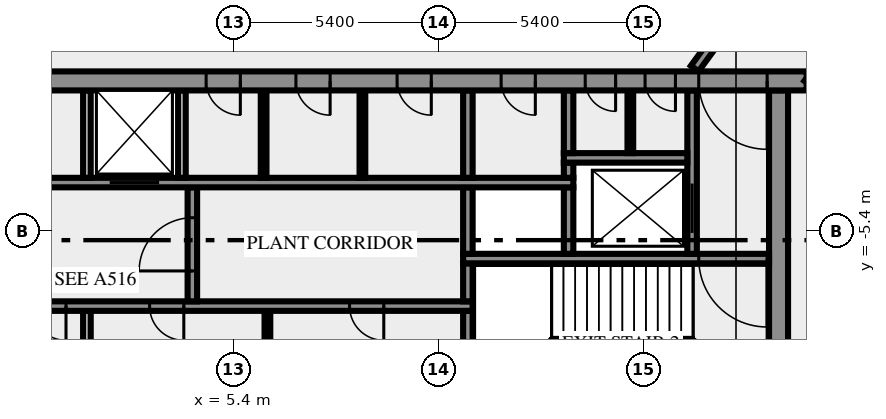
"""IFC4 building model, lengths in metres.
Left out: names, types, materials, properties, quantities, classifications, styles, units other than length and angle.
Written with IfcOpenShell. Run it as: python <this file> out.ifc"""

import sys

from ifc_helpers import new_model, si_unit, direction, frame, frame_2d, origin, place, context, subcontext, project, spatial, rectangle, extrude, element, fill, save


model = new_model("IFC4")
c1 = context("Model", 3, precision=1e-05, world=origin(), true_north=direction((0.0, 1.0)))
c2 = subcontext(c1, "Body", "Model", "MODEL_VIEW")
j1 = project(units=[si_unit("LENGTHUNIT", "METRE"), si_unit("PLANEANGLEUNIT", "RADIAN")], contexts=[c1])
p1 = place(None, origin())
s1 = spatial("IfcSite", under=j1, at=p1, CompositionType="ELEMENT")
p2 = place(p1, origin())
s2 = spatial("IfcBuilding", under=s1, at=p2, CompositionType="ELEMENT")
p3 = place(p2, frame((0.0, 0.0, 301.0)))
s3 = spatial("IfcBuildingStorey", under=s2, at=p3, CompositionType="ELEMENT", Elevation=301.0)
p4 = place(p3, frame((1.55, -10.5, 0.0), z_axis=(0.0, 0.0, 1.0), x_axis=(0.0, 1.0, 0.0)))
e1 = element("IfcWall", 1, at=p4, inside=s3, PredefinedType="SOLIDWALL", context=c2, shape_type="SweptSolid", body=[
    extrude(rectangle(XDim=3.0, YDim=0.2, at=frame_2d((1.5, 0.0))), origin(), (0.0, 0.0, 1.0), 5.65),
])
p5 = place(p3, frame((6.3, -10.5, 0.0), z_axis=(0.0, 0.0, 1.0), x_axis=(0.0, 1.0, 0.0)))
e2 = element("IfcWall", 2, at=p5, inside=s3, PredefinedType="PARTITIONING", context=c2, shape_type="SweptSolid", body=[
    extrude(rectangle(XDim=3.0, YDim=0.15, at=frame_2d((1.5, 0.0))), origin(), (0.0, 0.0, 1.0), 5.65),
])
p6 = place(p3, frame((11.575, -10.5, 0.0), z_axis=(0.0, 0.0, 1.0), x_axis=(0.0, 1.0, 0.0)))
e3 = element("IfcWall", 3, at=p6, inside=s3, PredefinedType="SHEAR", context=c2, shape_type="SweptSolid", body=[
    extrude(rectangle(XDim=3.0, YDim=0.25, at=frame_2d((1.5, 0.0))), origin(), (0.0, 0.0, 1.0), 5.65),
])
p7 = place(p3, frame((19.75, -10.5, 0.0), z_axis=(0.0, 0.0, 1.0), x_axis=(0.0, 1.0, 0.0)))
e4 = element("IfcWall", 4, at=p7, inside=s3, PredefinedType="SHEAR", context=c2, shape_type="SweptSolid", body=[
    extrude(rectangle(XDim=8.8, YDim=0.5, at=frame_2d((4.4, 0.0))), origin(), (0.0, 0.0, 1.0), 5.65),
])
p8 = place(p3, frame((11.7, -7.375, 0.0), z_axis=(0.0, 0.0, 1.0), x_axis=(-1.0, 0.0, 0.0)))
e5 = element("IfcWall", 5, at=p8, inside=s3, PredefinedType="SHEAR", context=c2, shape_type="SweptSolid", body=[
    extrude(rectangle(XDim=23.4, YDim=0.25, at=frame_2d((11.7, 0.0))), origin(), (0.0, 0.0, 1.0), 5.65),
])
p9 = place(p8, frame((13.475, 0.0, 0.0)))
e6 = element("IfcOpeningElement", 6, at=p9, cuts=e5, PredefinedType="OPENING", context=c2, shape_type="SweptSolid", body=[
    extrude(rectangle(XDim=0.9, YDim=2.1, at=frame_2d((0.45, 1.05))), frame((0.0, 0.135, 0.0), z_axis=(0.0, -1.0, 0.0), x_axis=(1.0, 0.0, 0.0)), (0.0, 0.0, 1.0), 0.27),
])
p10 = place(p8, frame((10.7, 0.0, 0.0)))
e7 = element("IfcOpeningElement", 7, at=p10, cuts=e5, PredefinedType="OPENING", context=c2, shape_type="SweptSolid", body=[
    extrude(rectangle(XDim=0.9, YDim=2.1, at=frame_2d((0.45, 1.05))), frame((0.0, 0.135, 0.0), z_axis=(0.0, -1.0, 0.0), x_axis=(1.0, 0.0, 0.0)), (0.0, 0.0, 1.0), 0.27),
])
p11 = place(p8, frame((7.6, 0.0, 0.0)))
e8 = element("IfcOpeningElement", 8, at=p11, cuts=e5, PredefinedType="OPENING", context=c2, shape_type="SweptSolid", body=[
    extrude(rectangle(XDim=0.9, YDim=2.1, at=frame_2d((0.45, 1.05))), frame((0.0, 0.135, 0.0), z_axis=(0.0, -1.0, 0.0), x_axis=(1.0, 0.0, 0.0)), (0.0, 0.0, 1.0), 0.27),
])
p12 = place(p8, frame((2.338, 0.0, 0.0)))
e9 = element("IfcOpeningElement", 9, at=p12, cuts=e5, PredefinedType="OPENING", context=c2, shape_type="SweptSolid", body=[
    extrude(rectangle(XDim=0.9, YDim=2.1, at=frame_2d((0.45, 1.05))), frame((0.0, 0.135, 0.0), z_axis=(0.0, -1.0, 0.0), x_axis=(1.0, 0.0, 0.0)), (0.0, 0.0, 1.0), 0.27),
])
p13 = place(p3, frame((4.325, -7.25, 0.0), z_axis=(0.0, 0.0, 1.0), x_axis=(0.0, 1.0, 0.0)))
e10 = element("IfcWall", 10, at=p13, inside=s3, PredefinedType="SHEAR", context=c2, shape_type="SweptSolid", body=[
    extrude(rectangle(XDim=3.0, YDim=0.25, at=frame_2d((1.5, 0.0))), origin(), (0.0, 0.0, 1.0), 5.65),
])
p14 = place(p13, frame((0.8, 0.0, 0.0)))
e11 = element("IfcOpeningElement", 11, at=p14, cuts=e10, PredefinedType="OPENING", context=c2, shape_type="SweptSolid", body=[
    extrude(rectangle(XDim=1.4, YDim=2.1, at=frame_2d((0.7, 1.05))), frame((0.0, 0.135, 0.0), z_axis=(0.0, -1.0, 0.0), x_axis=(1.0, 0.0, 0.0)), (0.0, 0.0, 1.0), 0.27),
])
p15 = place(p3, frame((11.575, -7.25, 0.0), z_axis=(0.0, 0.0, 1.0), x_axis=(0.0, 1.0, 0.0)))
e12 = element("IfcWall", 12, at=p15, inside=s3, PredefinedType="SHEAR", context=c2, shape_type="SweptSolid", body=[
    extrude(rectangle(XDim=1.0, YDim=0.25, at=frame_2d((0.5, 0.0))), origin(), (0.0, 0.0, 1.0), 5.65),
])
p16 = place(p3, frame((19.5, -6.125, 0.0), z_axis=(0.0, 0.0, 1.0), x_axis=(-1.0, 0.0, 0.0)))
e13 = element("IfcWall", 13, at=p16, inside=s3, PredefinedType="SHEAR", context=c2, shape_type="SweptSolid", body=[
    extrude(rectangle(XDim=8.05, YDim=0.25, at=frame_2d((4.025, 0.0))), origin(), (0.0, 0.0, 1.0), 5.65),
])
p17 = place(p16, frame((0.05, 0.0, 0.0)))
e14 = element("IfcOpeningElement", 14, at=p17, cuts=e13, PredefinedType="OPENING", context=c2, shape_type="SweptSolid", body=[
    extrude(rectangle(XDim=1.8, YDim=2.1, at=frame_2d((0.9, 1.05))), frame((0.0, 0.135, 0.0), z_axis=(0.0, -1.0, 0.0), x_axis=(1.0, 0.0, 0.0)), (0.0, 0.0, 1.0), 0.27),
])
for number, where, z_axis, x_axis in (
    (15, (11.575, -6.0, 0.0), (0.0, 0.0, 1.0), (0.0, 1.0, 0.0)),
    (16, (14.225, -6.0, 0.0), (0.0, 0.0, 1.0), (0.0, 1.0, 0.0)),
):
    element("IfcWall", number, at=place(p3, frame(where, z_axis=z_axis, x_axis=x_axis)), inside=s3, PredefinedType="SHEAR", context=c2, shape_type="SweptSolid", body=[
        extrude(rectangle(XDim=1.75, YDim=0.25, at=frame_2d((0.875, 0.0))), origin(), (0.0, 0.0, 1.0), 5.65),
    ])
p18 = place(p3, frame((17.475, -6.0, 0.0), z_axis=(0.0, 0.0, 1.0), x_axis=(0.0, 1.0, 0.0)))
e17 = element("IfcWall", 17, at=p18, inside=s3, PredefinedType="SHEAR", context=c2, shape_type="SweptSolid", body=[
    extrude(rectangle(XDim=4.3, YDim=0.25, at=frame_2d((2.15, 0.0))), origin(), (0.0, 0.0, 1.0), 5.65),
])
p19 = place(p18, frame((0.55, 0.0, 0.0)))
e18 = element("IfcOpeningElement", 18, at=p19, cuts=e17, PredefinedType="OPENING", context=c2, shape_type="SweptSolid", body=[
    extrude(rectangle(XDim=1.3, YDim=2.1, at=frame_2d((0.65, 1.05))), frame((0.0, 0.135, 0.0), z_axis=(0.0, -1.0, 0.0), x_axis=(1.0, 0.0, 0.0)), (0.0, 0.0, 1.0), 0.27),
])
p20 = place(p3, frame((-0.6, -4.125, 0.0), z_axis=(0.0, 0.0, 1.0), x_axis=(1.0, 0.0, 0.0)))
e19 = element("IfcWall", 19, at=p20, inside=s3, PredefinedType="SHEAR", context=c2, shape_type="SweptSolid", body=[
    extrude(rectangle(XDim=14.95, YDim=0.25, at=frame_2d((7.475, 0.0))), origin(), (0.0, 0.0, 1.0), 5.65),
])
p21 = place(p20, frame((2.75, 0.0, 0.0)))
e20 = element("IfcOpeningElement", 20, at=p21, cuts=e19, PredefinedType="OPENING", context=c2, shape_type="SweptSolid", body=[
    extrude(rectangle(XDim=1.3, YDim=2.1, at=frame_2d((0.65, 1.05))), frame((0.0, 0.135, 0.0), z_axis=(0.0, -1.0, 0.0), x_axis=(1.0, 0.0, 0.0)), (0.0, 0.0, 1.0), 0.27),
])
for number, where, z_axis, x_axis in (
    (21, (1.55, -4.0, 0.0), (0.0, 0.0, 1.0), (0.0, 1.0, 0.0)),
    (22, (4.05, -4.0, 0.0), (0.0, 0.0, 1.0), (0.0, 1.0, 0.0)),
):
    element("IfcWall", number, at=place(p3, frame(where, z_axis=z_axis, x_axis=x_axis)), inside=s3, PredefinedType="SOLIDWALL", context=c2, shape_type="SweptSolid", body=[
        extrude(rectangle(XDim=2.3, YDim=0.2, at=frame_2d((1.15, 0.0))), origin(), (0.0, 0.0, 1.0), 5.65),
    ])
for number, where, z_axis, x_axis in (
    (23, (6.2, -4.0, 0.0), (0.0, 0.0, 1.0), (0.0, 1.0, 0.0)),
    (24, (8.8, -4.0, 0.0), (0.0, 0.0, 1.0), (0.0, 1.0, 0.0)),
):
    element("IfcWall", number, at=place(p3, frame(where, z_axis=z_axis, x_axis=x_axis)), inside=s3, PredefinedType="PARTITIONING", context=c2, shape_type="SweptSolid", body=[
        extrude(rectangle(XDim=2.3, YDim=0.15, at=frame_2d((1.15, 0.0))), origin(), (0.0, 0.0, 1.0), 5.65),
    ])
p22 = place(p3, frame((11.575, -4.0, 0.0), z_axis=(0.0, 0.0, 1.0), x_axis=(0.0, 1.0, 0.0)))
e25 = element("IfcWall", 25, at=p22, inside=s3, PredefinedType="SHEAR", context=c2, shape_type="SweptSolid", body=[
    extrude(rectangle(XDim=2.3, YDim=0.25, at=frame_2d((1.15, 0.0))), origin(), (0.0, 0.0, 1.0), 5.65),
])
p23 = place(p3, frame((14.225, -4.0, 0.0), z_axis=(0.0, 0.0, 1.0), x_axis=(0.0, 1.0, 0.0)))
e26 = element("IfcWall", 26, at=p23, inside=s3, PredefinedType="SHEAR", context=c2, shape_type="SweptSolid", body=[
    extrude(rectangle(XDim=0.4, YDim=0.25, at=frame_2d((0.2, 0.0))), origin(), (0.0, 0.0, 1.0), 5.65),
])
p24 = place(p3, frame((14.1, -3.475, 0.0), z_axis=(0.0, 0.0, 1.0), x_axis=(1.0, 0.0, 0.0)))
e27 = element("IfcWall", 27, at=p24, inside=s3, PredefinedType="SHEAR", context=c2, shape_type="SweptSolid", body=[
    extrude(rectangle(XDim=3.25, YDim=0.25, at=frame_2d((1.625, 0.0))), origin(), (0.0, 0.0, 1.0), 5.65),
])
p25 = place(p3, frame((14.225, -3.35, 0.0), z_axis=(0.0, 0.0, 1.0), x_axis=(0.0, 1.0, 0.0)))
e28 = element("IfcWall", 28, at=p25, inside=s3, PredefinedType="SHEAR", context=c2, shape_type="SweptSolid", body=[
    extrude(rectangle(XDim=1.65, YDim=0.25, at=frame_2d((0.825, 0.0))), origin(), (0.0, 0.0, 1.0), 5.65),
])
p26 = place(p3, frame((15.85, -3.35, 0.0), z_axis=(0.0, 0.0, 1.0), x_axis=(0.0, 1.0, 0.0)))
e29 = element("IfcWall", 29, at=p26, inside=s3, PredefinedType="PARTITIONING", context=c2, shape_type="SweptSolid", body=[
    extrude(rectangle(XDim=1.65, YDim=0.15, at=frame_2d((0.825, 0.0))), origin(), (0.0, 0.0, 1.0), 5.65),
])
p27 = place(p3, frame((20.49, -1.45, 0.0), z_axis=(0.0, 0.0, 1.0), x_axis=(-1.0, 0.0, 0.0)))
e30 = element("IfcWall", 30, at=p27, inside=s3, PredefinedType="SHEAR", context=c2, shape_type="SweptSolid", body=[
    extrude(rectangle(XDim=40.98, YDim=0.5, at=frame_2d((20.49, 0.0))), origin(), (0.0, 0.0, 1.0), 5.65),
])
p28 = place(p27, frame((38.14, 0.0, 0.0)))
e31 = element("IfcOpeningElement", 31, at=p28, cuts=e30, PredefinedType="OPENING", context=c2, shape_type="SweptSolid", body=[
    extrude(rectangle(XDim=1.8, YDim=2.1, at=frame_2d((0.9, 1.05))), frame((0.0, 0.26, 0.0), z_axis=(0.0, -1.0, 0.0), x_axis=(1.0, 0.0, 0.0)), (0.0, 0.0, 1.0), 0.52),
])
p29 = place(p27, frame((35.89, 0.0, 0.0)))
e32 = element("IfcOpeningElement", 32, at=p29, cuts=e30, PredefinedType="OPENING", context=c2, shape_type="SweptSolid", body=[
    extrude(rectangle(XDim=0.9, YDim=2.1, at=frame_2d((0.45, 1.05))), frame((0.0, 0.26, 0.0), z_axis=(0.0, -1.0, 0.0), x_axis=(1.0, 0.0, 0.0)), (0.0, 0.0, 1.0), 0.52),
])
p30 = place(p27, frame((32.94, 0.0, 0.0)))
e33 = element("IfcOpeningElement", 33, at=p30, cuts=e30, PredefinedType="OPENING", context=c2, shape_type="SweptSolid", body=[
    extrude(rectangle(XDim=0.9, YDim=2.1, at=frame_2d((0.45, 1.05))), frame((0.0, 0.26, 0.0), z_axis=(0.0, -1.0, 0.0), x_axis=(1.0, 0.0, 0.0)), (0.0, 0.0, 1.0), 0.52),
])
p31 = place(p27, frame((21.765, 0.0, 0.0)))
e34 = element("IfcOpeningElement", 34, at=p31, cuts=e30, PredefinedType="OPENING", context=c2, shape_type="SweptSolid", body=[
    extrude(rectangle(XDim=2.0, YDim=2.1, at=frame_2d((1.0, 1.05))), frame((0.0, 0.26, 0.0), z_axis=(0.0, -1.0, 0.0), x_axis=(1.0, 0.0, 0.0)), (0.0, 0.0, 1.0), 0.52),
])
p32 = place(p27, frame((14.903, 0.0, 0.0)))
e35 = element("IfcOpeningElement", 35, at=p32, cuts=e30, PredefinedType="OPENING", context=c2, shape_type="SweptSolid", body=[
    extrude(rectangle(XDim=0.9, YDim=2.1, at=frame_2d((0.45, 1.05))), frame((0.0, 0.26, 0.0), z_axis=(0.0, -1.0, 0.0), x_axis=(1.0, 0.0, 0.0)), (0.0, 0.0, 1.0), 0.52),
])
p33 = place(p27, frame((12.54, 0.0, 0.0)))
e36 = element("IfcOpeningElement", 36, at=p33, cuts=e30, PredefinedType="OPENING", context=c2, shape_type="SweptSolid", body=[
    extrude(rectangle(XDim=0.9, YDim=2.1, at=frame_2d((0.45, 1.05))), frame((0.0, 0.26, 0.0), z_axis=(0.0, -1.0, 0.0), x_axis=(1.0, 0.0, 0.0)), (0.0, 0.0, 1.0), 0.52),
])
p34 = place(p27, frame((9.877, 0.0, 0.0)))
e37 = element("IfcOpeningElement", 37, at=p34, cuts=e30, PredefinedType="OPENING", context=c2, shape_type="SweptSolid", body=[
    extrude(rectangle(XDim=0.9, YDim=2.1, at=frame_2d((0.45, 1.05))), frame((0.0, 0.26, 0.0), z_axis=(0.0, -1.0, 0.0), x_axis=(1.0, 0.0, 0.0)), (0.0, 0.0, 1.0), 0.52),
])
p35 = place(p27, frame((7.14, 0.0, 0.0)))
e38 = element("IfcOpeningElement", 38, at=p35, cuts=e30, PredefinedType="OPENING", context=c2, shape_type="SweptSolid", body=[
    extrude(rectangle(XDim=0.9, YDim=2.1, at=frame_2d((0.45, 1.05))), frame((0.0, 0.26, 0.0), z_axis=(0.0, -1.0, 0.0), x_axis=(1.0, 0.0, 0.0)), (0.0, 0.0, 1.0), 0.52),
])
p36 = place(p27, frame((5.028, 0.0, 0.0)))
e39 = element("IfcOpeningElement", 39, at=p36, cuts=e30, PredefinedType="OPENING", context=c2, shape_type="SweptSolid", body=[
    extrude(rectangle(XDim=0.8, YDim=2.1, at=frame_2d((0.4, 1.05))), frame((0.0, 0.26, 0.0), z_axis=(0.0, -1.0, 0.0), x_axis=(1.0, 0.0, 0.0)), (0.0, 0.0, 1.0), 0.52),
])
p37 = place(p27, frame((3.452, 0.0, 0.0)))
e40 = element("IfcOpeningElement", 40, at=p37, cuts=e30, PredefinedType="OPENING", context=c2, shape_type="SweptSolid", body=[
    extrude(rectangle(XDim=0.8, YDim=2.1, at=frame_2d((0.4, 1.05))), frame((0.0, 0.26, 0.0), z_axis=(0.0, -1.0, 0.0), x_axis=(1.0, 0.0, 0.0)), (0.0, 0.0, 1.0), 0.52),
])
p38 = place(p27, frame((1.04, 0.0, 0.0)))
e41 = element("IfcOpeningElement", 41, at=p38, cuts=e30, PredefinedType="OPENING", context=c2, shape_type="SweptSolid", body=[
    extrude(rectangle(XDim=1.8, YDim=2.1, at=frame_2d((0.9, 1.05))), frame((0.0, 0.26, 0.0), z_axis=(0.0, -1.0, 0.0), x_axis=(1.0, 0.0, 0.0)), (0.0, 0.0, 1.0), 0.52),
])
p39 = place(p3, frame((17.545, -1.125, 0.0), z_axis=(0.0, 0.0, 1.0), x_axis=(0.587789755823, 0.80901372235, 0.0)))
e42 = element("IfcWall", 42, at=p39, inside=s3, PredefinedType="SOLIDWALL", context=c2, shape_type="SweptSolid", body=[
    extrude(rectangle(XDim=23.645, YDim=0.25, at=frame_2d((11.822, 0.0))), origin(), (0.0, 0.0, 1.0), 5.65),
])
p40 = place(p39, frame((21.303, 0.0, 0.0)))
e43 = element("IfcOpeningElement", 43, at=p40, cuts=e42, PredefinedType="OPENING", context=c2, shape_type="SweptSolid", body=[
    extrude(rectangle(XDim=1.2, YDim=2.1, at=frame_2d((0.6, 1.05))), frame((0.0, 0.135, 0.0), z_axis=(0.0, -1.0, 0.0), x_axis=(1.0, 0.0, 0.0)), (0.0, 0.0, 1.0), 0.27),
])
p41 = place(p3, frame((33.531, 16.369, 0.0), z_axis=(0.0, 0.0, 1.0), x_axis=(-0.587781095509, -0.809020014438, 0.0)))
e44 = element("IfcWall", 44, at=p41, inside=s3, PredefinedType="SOLIDWALL", context=c2, shape_type="SweptSolid", body=[
    extrude(rectangle(XDim=22.117, YDim=0.25, at=frame_2d((11.058, 0.0))), origin(), (0.0, 0.0, 1.0), 5.65),
])
p42 = place(p41, frame((20.384, 0.0, 0.0)))
e45 = element("IfcOpeningElement", 45, at=p42, cuts=e44, PredefinedType="OPENING", context=c2, shape_type="SweptSolid", body=[
    extrude(rectangle(XDim=1.2, YDim=2.1, at=frame_2d((0.6, 1.05))), frame((0.0, 0.135, 0.0), z_axis=(0.0, -1.0, 0.0), x_axis=(1.0, 0.0, 0.0)), (0.0, 0.0, 1.0), 0.27),
])
p43 = place(p41, frame((1.046, 0.0, 0.0)))
e46 = element("IfcOpeningElement", 46, at=p43, cuts=e44, PredefinedType="OPENING", context=c2, shape_type="SweptSolid", body=[
    extrude(rectangle(XDim=1.2, YDim=2.1, at=frame_2d((0.6, 1.05))), frame((0.0, 0.135, 0.0), z_axis=(0.0, -1.0, 0.0), x_axis=(1.0, 0.0, 0.0)), (0.0, 0.0, 1.0), 0.27),
])
p44 = place(p10, origin())
e47 = element("IfcDoor", 47, at=p44, inside=s3, OperationType="SINGLE_SWING_LEFT", PredefinedType="DOOR", context=c2, shape_type="SweptSolid", body=[
    extrude(rectangle(XDim=0.9, YDim=2.1, at=frame_2d((0.45, 1.05))), frame((0.0, 0.025, 0.0), z_axis=(0.0, -1.0, 0.0), x_axis=(1.0, 0.0, 0.0)), (0.0, 0.0, 1.0), 0.05),
])
fill(e7, e47)
p45 = place(p11, origin())
e48 = element("IfcDoor", 48, at=p45, inside=s3, OperationType="SINGLE_SWING_LEFT", PredefinedType="DOOR", context=c2, shape_type="SweptSolid", body=[
    extrude(rectangle(XDim=0.9, YDim=2.1, at=frame_2d((0.45, 1.05))), frame((0.0, 0.025, 0.0), z_axis=(0.0, -1.0, 0.0), x_axis=(1.0, 0.0, 0.0)), (0.0, 0.0, 1.0), 0.05),
])
fill(e8, e48)
p46 = place(p12, origin())
e49 = element("IfcDoor", 49, at=p46, inside=s3, OperationType="SINGLE_SWING_LEFT", PredefinedType="DOOR", context=c2, shape_type="SweptSolid", body=[
    extrude(rectangle(XDim=0.9, YDim=2.1, at=frame_2d((0.45, 1.05))), frame((0.0, 0.025, 0.0), z_axis=(0.0, -1.0, 0.0), x_axis=(1.0, 0.0, 0.0)), (0.0, 0.0, 1.0), 0.05),
])
fill(e9, e49)
p47 = place(p14, origin())
e50 = element("IfcDoor", 50, at=p47, inside=s3, OperationType="DOUBLE_DOOR_SINGLE_SWING", PredefinedType="DOOR", context=c2, shape_type="SweptSolid", body=[
    extrude(rectangle(XDim=1.4, YDim=2.1, at=frame_2d((0.7, 1.05))), frame((0.0, 0.025, 0.0), z_axis=(0.0, -1.0, 0.0), x_axis=(1.0, 0.0, 0.0)), (0.0, 0.0, 1.0), 0.05),
])
fill(e11, e50)
p48 = place(p17, origin())
e51 = element("IfcDoor", 51, at=p48, inside=s3, OperationType="DOUBLE_DOOR_SINGLE_SWING", PredefinedType="DOOR", context=c2, shape_type="SweptSolid", body=[
    extrude(rectangle(XDim=1.8, YDim=2.1, at=frame_2d((0.9, 1.05))), frame((0.0, 0.025, 0.0), z_axis=(0.0, -1.0, 0.0), x_axis=(1.0, 0.0, 0.0)), (0.0, 0.0, 1.0), 0.05),
])
fill(e14, e51)
p49 = place(p19, origin())
e52 = element("IfcDoor", 52, at=p49, inside=s3, OperationType="DOUBLE_DOOR_SLIDING", PredefinedType="DOOR", context=c2, shape_type="SweptSolid", body=[
    extrude(rectangle(XDim=1.3, YDim=2.1, at=frame_2d((0.65, 1.05))), frame((0.0, 0.025, 0.0), z_axis=(0.0, -1.0, 0.0), x_axis=(1.0, 0.0, 0.0)), (0.0, 0.0, 1.0), 0.05),
])
fill(e18, e52)
p50 = place(p21, origin())
e53 = element("IfcDoor", 53, at=p50, inside=s3, OperationType="DOUBLE_DOOR_SLIDING", PredefinedType="DOOR", context=c2, shape_type="SweptSolid", body=[
    extrude(rectangle(XDim=1.3, YDim=2.1, at=frame_2d((0.65, 1.05))), frame((0.0, 0.025, 0.0), z_axis=(0.0, -1.0, 0.0), x_axis=(1.0, 0.0, 0.0)), (0.0, 0.0, 1.0), 0.05),
])
fill(e20, e53)
p51 = place(p32, origin())
e54 = element("IfcDoor", 54, at=p51, inside=s3, OperationType="SINGLE_SWING_LEFT", PredefinedType="DOOR", context=c2, shape_type="SweptSolid", body=[
    extrude(rectangle(XDim=0.9, YDim=2.1, at=frame_2d((0.45, 1.05))), frame((0.0, 0.025, 0.0), z_axis=(0.0, -1.0, 0.0), x_axis=(1.0, 0.0, 0.0)), (0.0, 0.0, 1.0), 0.05),
])
fill(e35, e54)
p52 = place(p33, origin())
e55 = element("IfcDoor", 55, at=p52, inside=s3, OperationType="SINGLE_SWING_LEFT", PredefinedType="DOOR", context=c2, shape_type="SweptSolid", body=[
    extrude(rectangle(XDim=0.9, YDim=2.1, at=frame_2d((0.45, 1.05))), frame((0.0, 0.025, 0.0), z_axis=(0.0, -1.0, 0.0), x_axis=(1.0, 0.0, 0.0)), (0.0, 0.0, 1.0), 0.05),
])
fill(e36, e55)
p53 = place(p34, origin())
e56 = element("IfcDoor", 56, at=p53, inside=s3, OperationType="SINGLE_SWING_LEFT", PredefinedType="DOOR", context=c2, shape_type="SweptSolid", body=[
    extrude(rectangle(XDim=0.9, YDim=2.1, at=frame_2d((0.45, 1.05))), frame((0.0, 0.025, 0.0), z_axis=(0.0, -1.0, 0.0), x_axis=(1.0, 0.0, 0.0)), (0.0, 0.0, 1.0), 0.05),
])
fill(e37, e56)
p54 = place(p35, origin())
e57 = element("IfcDoor", 57, at=p54, inside=s3, OperationType="SINGLE_SWING_LEFT", PredefinedType="DOOR", context=c2, shape_type="SweptSolid", body=[
    extrude(rectangle(XDim=0.9, YDim=2.1, at=frame_2d((0.45, 1.05))), frame((0.0, 0.025, 0.0), z_axis=(0.0, -1.0, 0.0), x_axis=(1.0, 0.0, 0.0)), (0.0, 0.0, 1.0), 0.05),
])
fill(e38, e57)
p55 = place(p36, origin())
e58 = element("IfcDoor", 58, at=p55, inside=s3, OperationType="SINGLE_SWING_LEFT", PredefinedType="DOOR", context=c2, shape_type="SweptSolid", body=[
    extrude(rectangle(XDim=0.8, YDim=2.1, at=frame_2d((0.4, 1.05))), frame((0.0, 0.025, 0.0), z_axis=(0.0, -1.0, 0.0), x_axis=(1.0, 0.0, 0.0)), (0.0, 0.0, 1.0), 0.05),
])
fill(e39, e58)
p56 = place(p37, origin())
e59 = element("IfcDoor", 59, at=p56, inside=s3, OperationType="SINGLE_SWING_LEFT", PredefinedType="DOOR", context=c2, shape_type="SweptSolid", body=[
    extrude(rectangle(XDim=0.8, YDim=2.1, at=frame_2d((0.4, 1.05))), frame((0.0, 0.025, 0.0), z_axis=(0.0, -1.0, 0.0), x_axis=(1.0, 0.0, 0.0)), (0.0, 0.0, 1.0), 0.05),
])
fill(e40, e59)
p57 = place(p38, origin())
e60 = element("IfcDoor", 60, at=p57, inside=s3, OperationType="DOUBLE_DOOR_SINGLE_SWING", PredefinedType="DOOR", context=c2, shape_type="SweptSolid", body=[
    extrude(rectangle(XDim=1.8, YDim=2.1, at=frame_2d((0.9, 1.05))), frame((0.0, 0.025, 0.0), z_axis=(0.0, -1.0, 0.0), x_axis=(1.0, 0.0, 0.0)), (0.0, 0.0, 1.0), 0.05),
])
fill(e41, e60)
save(model, sys.argv[1])
